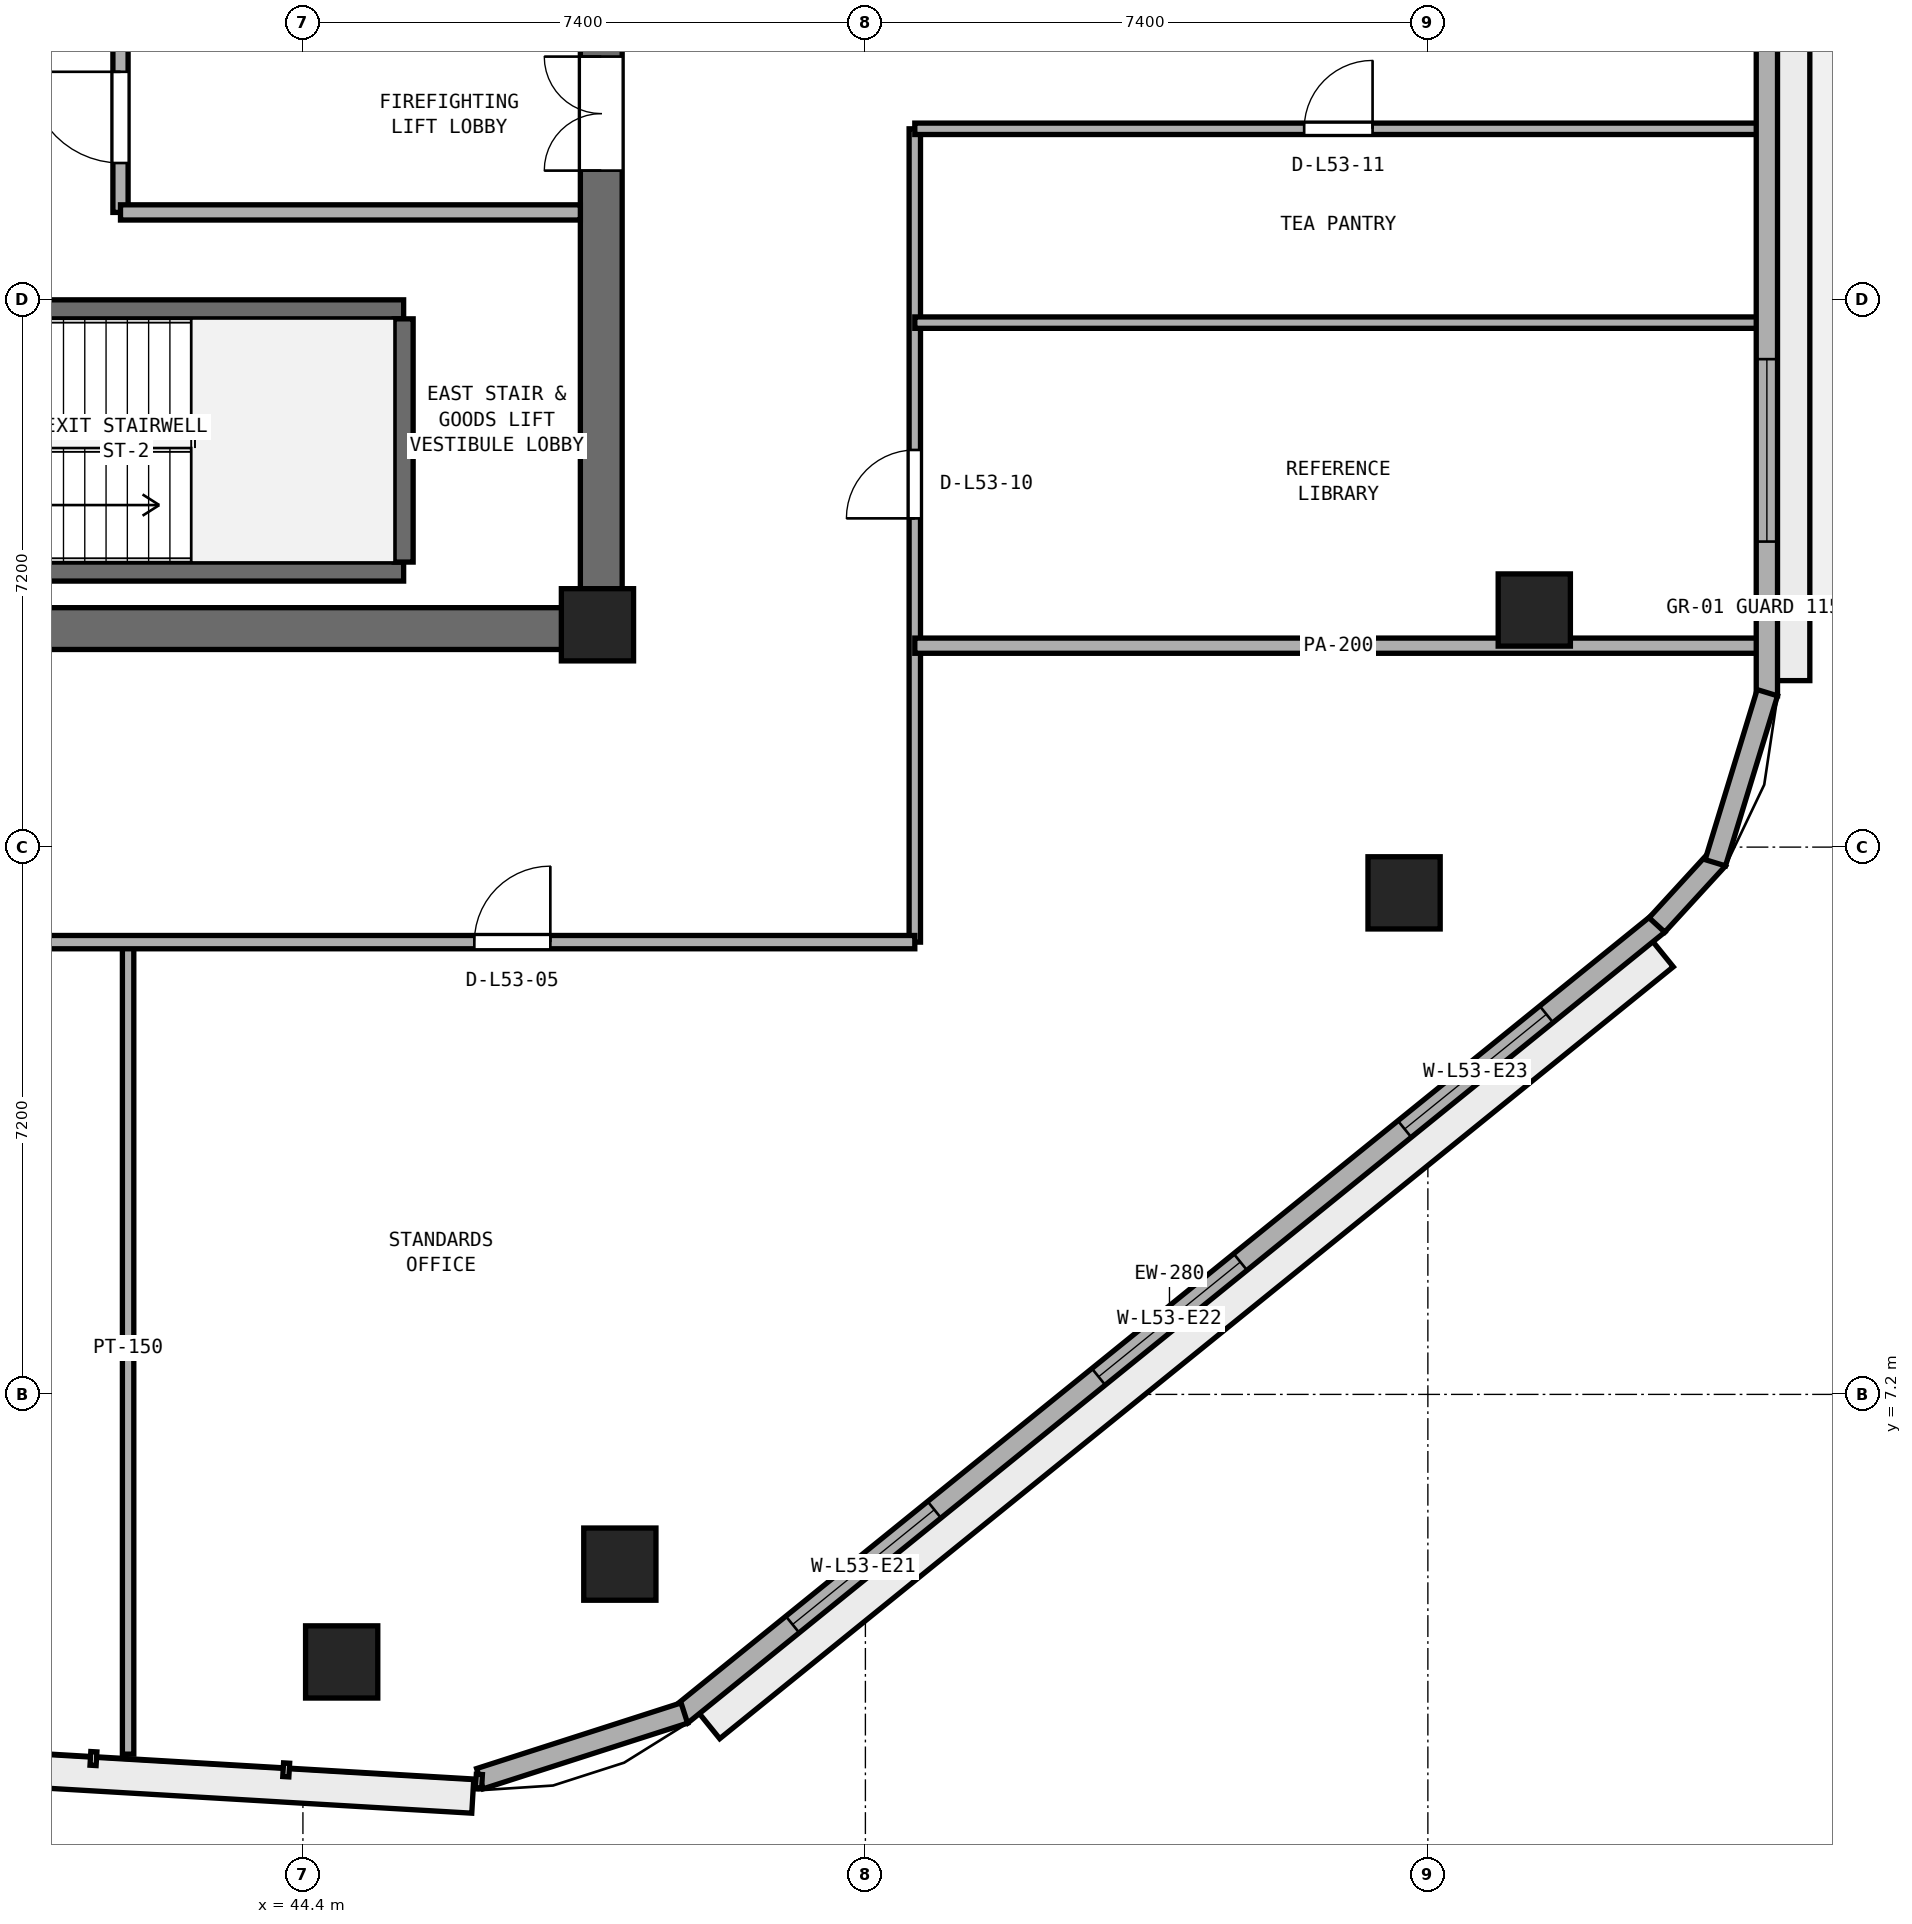
"""IFC4 building model, lengths in metres.
Left out: names, types, materials, properties, quantities, classifications, styles, units other than length and angle.
Written with IfcOpenShell. Run it as: python <this file> out.ifc"""

import sys

from ifc_helpers import new_model, si_unit, direction, frame, frame_2d, origin, origin_2d, place, context, subcontext, project, spatial, rectangle, extrude, element, fill, save


model = new_model("IFC4")
c1 = context("Model", 3, precision=1e-05, world=origin(), true_north=direction((0.0, 1.0)))
c2 = subcontext(c1, "Body", "Model", "MODEL_VIEW")
j1 = project(units=[si_unit("LENGTHUNIT", "METRE"), si_unit("PLANEANGLEUNIT", "RADIAN")], contexts=[c1])
p1 = place(None, origin())
s1 = spatial("IfcSite", under=j1, at=p1, CompositionType="ELEMENT")
p2 = place(p1, origin())
s2 = spatial("IfcBuilding", under=s1, at=p2, CompositionType="ELEMENT")
p3 = place(p2, frame((0.0, 0.0, 208.6)))
s3 = spatial("IfcBuildingStorey", under=s2, at=p3, CompositionType="ELEMENT", Elevation=208.6)
p4 = place(p3, frame((25.4, 17.275, 0.0), z_axis=(0.0, 0.0, 1.0), x_axis=(1.0, 0.0, 0.0)))
e1 = element("IfcWall", 1, at=p4, inside=s3, PredefinedType="SHEAR", context=c2, shape_type="SweptSolid", body=[
    extrude(rectangle(XDim=23.2, YDim=0.55, at=frame_2d((11.6, 0.0))), origin(), (0.0, 0.0, 1.0), 3.54),
])
p5 = place(p3, frame((48.325, 17.55, 0.0), z_axis=(0.0, 0.0, 1.0), x_axis=(0.0, 1.0, 0.0)))
e2 = element("IfcWall", 2, at=p5, inside=s3, PredefinedType="SHEAR", context=c2, shape_type="SweptSolid", body=[
    extrude(rectangle(XDim=15.3, YDim=0.55, at=frame_2d((7.65, 0.0))), origin(), (0.0, 0.0, 1.0), 3.54),
])
p6 = place(p5, frame((5.75, 0.0, 0.0)))
e3 = element("IfcOpeningElement", 3, at=p6, cuts=e2, PredefinedType="OPENING", context=c2, shape_type="SweptSolid", body=[
    extrude(rectangle(XDim=1.5, YDim=2.15, at=frame_2d((0.75, 1.075))), frame((0.0, 0.285, 0.0), z_axis=(0.0, -1.0, 0.0), x_axis=(1.0, 0.0, 0.0)), (0.0, 0.0, 1.0), 0.57),
])
p7 = place(p3, frame((48.275, 17.325, 0.0), z_axis=(0.0, 0.0, 1.0), x_axis=(1.0, 0.0, 0.0)))
e4 = element("IfcColumn", 4, at=p7, inside=s3, PredefinedType="PILASTER", context=c2, shape_type="SweptSolid", body=[
    extrude(rectangle(XDim=0.95, YDim=0.95, at=origin_2d()), origin(), (0.0, 0.0, 1.0), 3.8),
])
for number, where, z_axis, x_axis in (
    (5, (44.91, 3.68, 0.0), (0.0, 0.0, 1.0), (1.0, 0.0, 0.0)),
    (6, (48.57, 4.967, 0.0), (0.0, 0.0, 1.0), (1.0, 0.0, 0.0)),
    (7, (58.887, 13.798, 0.0), (0.0, 0.0, 1.0), (1.0, 0.0, 0.0)),
    (8, (60.6, 17.519, 0.0), (0.0, 0.0, 1.0), (1.0, 0.0, 0.0)),
):
    element("IfcColumn", number, at=place(p3, frame(where, z_axis=z_axis, x_axis=x_axis)), inside=s3, PredefinedType="COLUMN", context=c2, shape_type="SweptSolid", body=[
        extrude(rectangle(XDim=0.95, YDim=0.95, at=origin_2d()), origin(), (0.0, 0.0, 1.0), 3.8),
    ])
for number, where, z_axis, x_axis in (
    (9, (38.425, 18.025, 0.0), (0.0, 0.0, 1.0), (1.0, 0.0, 0.0)),
    (10, (38.425, 21.475, 0.0), (0.0, 0.0, 1.0), (1.0, 0.0, 0.0)),
):
    element("IfcWall", number, at=place(p3, frame(where, z_axis=z_axis, x_axis=x_axis)), inside=s3, PredefinedType="SHEAR", context=c2, shape_type="SweptSolid", body=[
        extrude(rectangle(XDim=7.3, YDim=0.25, at=frame_2d((3.65, 0.0))), origin(), (0.0, 0.0, 1.0), 3.54),
    ])
p8 = place(p3, frame((45.725, 18.15, 0.0), z_axis=(0.0, 0.0, 1.0), x_axis=(0.0, 1.0, 0.0)))
e11 = element("IfcWall", 11, at=p8, inside=s3, PredefinedType="SHEAR", context=c2, shape_type="SweptSolid", body=[
    extrude(rectangle(XDim=3.2, YDim=0.25, at=frame_2d((1.6, 0.0))), origin(), (0.0, 0.0, 1.0), 3.54),
])
p9 = place(p3, frame((42.0, 22.75, 0.0), z_axis=(0.0, 0.0, 1.0), x_axis=(0.0, 1.0, 0.0)))
e12 = element("IfcWall", 12, at=p9, inside=s3, PredefinedType="SOLIDWALL", context=c2, shape_type="SweptSolid", body=[
    extrude(rectangle(XDim=6.05, YDim=0.2, at=frame_2d((3.025, 0.0))), origin(), (0.0, 0.0, 1.0), 3.54),
])
p10 = place(p9, frame((0.65, 0.0, 0.0)))
e13 = element("IfcOpeningElement", 13, at=p10, cuts=e12, PredefinedType="OPENING", context=c2, shape_type="SweptSolid", body=[
    extrude(rectangle(XDim=1.2, YDim=2.15, at=frame_2d((0.6, 1.075))), frame((0.0, 0.11, 0.0), z_axis=(0.0, -1.0, 0.0), x_axis=(1.0, 0.0, 0.0)), (0.0, 0.0, 1.0), 0.22),
])
p11 = place(p3, frame((42.0, 22.75, 0.0), z_axis=(0.0, 0.0, 1.0), x_axis=(1.0, 0.0, 0.0)))
e14 = element("IfcWall", 14, at=p11, inside=s3, PredefinedType="SOLIDWALL", context=c2, shape_type="SweptSolid", body=[
    extrude(rectangle(XDim=6.05, YDim=0.2, at=frame_2d((3.025, 0.0))), origin(), (0.0, 0.0, 1.0), 3.54),
])
p12 = place(p3, frame((52.45, 13.15, 0.0), z_axis=(0.0, 0.0, 1.0), x_axis=(0.0, 1.0, 0.0)))
e15 = element("IfcWall", 15, at=p12, inside=s3, PredefinedType="PARTITIONING", context=c2, shape_type="SweptSolid", body=[
    extrude(rectangle(XDim=10.7, YDim=0.15, at=frame_2d((5.35, 0.0))), origin(), (0.0, 0.0, 1.0), 3.54),
])
p13 = place(p12, frame((5.575, 0.0, 0.0)))
e16 = element("IfcOpeningElement", 16, at=p13, cuts=e15, PredefinedType="OPENING", context=c2, shape_type="SweptSolid", body=[
    extrude(rectangle(XDim=0.9, YDim=2.1, at=frame_2d((0.45, 1.05))), frame((0.0, 0.085, 0.0), z_axis=(0.0, -1.0, 0.0), x_axis=(1.0, 0.0, 0.0)), (0.0, 0.0, 1.0), 0.17),
])
p14 = place(p3, frame((42.1, 2.467, 0.0), z_axis=(0.0, 0.0, 1.0), x_axis=(0.0, 1.0, 0.0)))
e17 = element("IfcWall", 17, at=p14, inside=s3, PredefinedType="PARTITIONING", context=c2, shape_type="SweptSolid", body=[
    extrude(rectangle(XDim=10.683, YDim=0.15, at=frame_2d((5.341, 0.0))), origin(), (0.0, 0.0, 1.0), 3.54),
])
p15 = place(p3, frame((21.55, 13.15, 0.0), z_axis=(0.0, 0.0, 1.0), x_axis=(1.0, 0.0, 0.0)))
e18 = element("IfcWall", 18, at=p15, inside=s3, PredefinedType="PARTITIONING", context=c2, shape_type="SweptSolid", body=[
    extrude(rectangle(XDim=30.9, YDim=0.175, at=frame_2d((15.45, 0.0))), origin(), (0.0, 0.0, 1.0), 3.54),
])
p16 = place(p15, frame((4.145, 0.0, 0.0)))
e19 = element("IfcOpeningElement", 19, at=p16, cuts=e18, PredefinedType="OPENING", context=c2, shape_type="SweptSolid", body=[
    extrude(rectangle(XDim=1.0, YDim=2.12, at=frame_2d((0.5, 1.06))), frame((0.0, 0.097, 0.0), z_axis=(0.0, -1.0, 0.0), x_axis=(1.0, 0.0, 0.0)), (0.0, 0.0, 1.0), 0.195),
])
p17 = place(p15, frame((14.3, 0.0, 0.0)))
e20 = element("IfcOpeningElement", 20, at=p17, cuts=e18, PredefinedType="OPENING", context=c2, shape_type="SweptSolid", body=[
    extrude(rectangle(XDim=1.0, YDim=2.12, at=frame_2d((0.5, 1.06))), frame((0.0, 0.097, 0.0), z_axis=(0.0, -1.0, 0.0), x_axis=(1.0, 0.0, 0.0)), (0.0, 0.0, 1.0), 0.195),
])
p18 = place(p15, frame((25.105, 0.0, 0.0)))
e21 = element("IfcOpeningElement", 21, at=p18, cuts=e18, PredefinedType="OPENING", context=c2, shape_type="SweptSolid", body=[
    extrude(rectangle(XDim=1.0, YDim=2.12, at=frame_2d((0.5, 1.06))), frame((0.0, 0.097, 0.0), z_axis=(0.0, -1.0, 0.0), x_axis=(1.0, 0.0, 0.0)), (0.0, 0.0, 1.0), 0.195),
])
p19 = place(p3, frame((52.45, 17.05, 0.0), z_axis=(0.0, 0.0, 1.0), x_axis=(1.0, 0.0, 0.0)))
e22 = element("IfcWall", 22, at=p19, inside=s3, PredefinedType="PARTITIONING", context=c2, shape_type="SweptSolid", body=[
    extrude(rectangle(XDim=11.145, YDim=0.2, at=frame_2d((5.573, 0.0))), origin(), (0.0, 0.0, 1.0), 2.79),
])
p20 = place(p3, frame((52.45, 21.3, 0.0), z_axis=(0.0, 0.0, 1.0), x_axis=(1.0, 0.0, 0.0)))
e23 = element("IfcWall", 23, at=p20, inside=s3, PredefinedType="PARTITIONING", context=c2, shape_type="SweptSolid", body=[
    extrude(rectangle(XDim=11.145, YDim=0.15, at=frame_2d((5.573, 0.0))), origin(), (0.0, 0.0, 1.0), 3.54),
])
p21 = place(p3, frame((52.45, 23.85, 0.0), z_axis=(0.0, 0.0, 1.0), x_axis=(1.0, 0.0, 0.0)))
e24 = element("IfcWall", 24, at=p21, inside=s3, PredefinedType="PARTITIONING", context=c2, shape_type="SweptSolid", body=[
    extrude(rectangle(XDim=11.145, YDim=0.15, at=frame_2d((5.573, 0.0))), origin(), (0.0, 0.0, 1.0), 3.54),
])
p22 = place(p21, frame((5.123, 0.0, 0.0)))
e25 = element("IfcOpeningElement", 25, at=p22, cuts=e24, PredefinedType="OPENING", context=c2, shape_type="SweptSolid", body=[
    extrude(rectangle(XDim=0.9, YDim=2.1, at=frame_2d((0.45, 1.05))), frame((0.0, 0.085, 0.0), z_axis=(0.0, -1.0, 0.0), x_axis=(1.0, 0.0, 0.0)), (0.0, 0.0, 1.0), 0.17),
])
p23 = place(p3, frame((49.372, 2.984, 0.0), z_axis=(0.0, 0.0, 1.0), x_axis=(0.777278899851, 0.629156190343, 0.0)))
e26 = element("IfcWall", 26, at=p23, inside=s3, PredefinedType="STANDARD", context=c2, shape_type="SweptSolid", body=[
    extrude(rectangle(XDim=16.54, YDim=0.28, at=frame_2d((8.27, 0.0))), origin(), (0.0, 0.0, 1.0), 3.54),
])
p24 = place(p23, frame((1.89, 0.0, 0.9)))
e27 = element("IfcOpeningElement", 27, at=p24, cuts=e26, PredefinedType="OPENING", context=c2, shape_type="SweptSolid", body=[
    extrude(rectangle(XDim=2.4, YDim=1.75, at=frame_2d((1.2, 0.875))), frame((0.0, 0.15, 0.0), z_axis=(0.0, -1.0, 0.0), x_axis=(1.0, 0.0, 0.0)), (0.0, 0.0, 1.0), 0.3),
])
p25 = place(p23, frame((7.07, 0.0, 0.9)))
e28 = element("IfcOpeningElement", 28, at=p25, cuts=e26, PredefinedType="OPENING", context=c2, shape_type="SweptSolid", body=[
    extrude(rectangle(XDim=2.4, YDim=1.75, at=frame_2d((1.2, 0.875))), frame((0.0, 0.15, 0.0), z_axis=(0.0, -1.0, 0.0), x_axis=(1.0, 0.0, 0.0)), (0.0, 0.0, 1.0), 0.3),
])
p26 = place(p23, frame((12.25, 0.0, 0.9)))
e29 = element("IfcOpeningElement", 29, at=p26, cuts=e26, PredefinedType="OPENING", context=c2, shape_type="SweptSolid", body=[
    extrude(rectangle(XDim=2.4, YDim=1.75, at=frame_2d((1.2, 0.875))), frame((0.0, 0.15, 0.0), z_axis=(0.0, -1.0, 0.0), x_axis=(1.0, 0.0, 0.0)), (0.0, 0.0, 1.0), 0.3),
])
p27 = place(p3, frame((63.66, 16.39, 0.0), z_axis=(0.0, 0.0, 1.0), x_axis=(0.0, 1.0, 0.0)))
e30 = element("IfcWall", 30, at=p27, inside=s3, PredefinedType="STANDARD", context=c2, shape_type="SweptSolid", body=[
    extrude(rectangle(XDim=18.876, YDim=0.28, at=frame_2d((9.438, 0.0))), origin(), (0.0, 0.0, 1.0), 3.54),
])
p28 = place(p27, frame((8.588, 0.0, 0.0)))
e31 = element("IfcOpeningElement", 31, at=p28, cuts=e30, PredefinedType="OPENING", context=c2, shape_type="SweptSolid", body=[
    extrude(rectangle(XDim=1.1, YDim=2.2, at=frame_2d((0.55, 1.1))), frame((0.0, 0.15, 0.0), z_axis=(0.0, -1.0, 0.0), x_axis=(1.0, 0.0, 0.0)), (0.0, 0.0, 1.0), 0.3),
])
p29 = place(p27, frame((2.029, 0.0, 0.9)))
e32 = element("IfcOpeningElement", 32, at=p29, cuts=e30, PredefinedType="OPENING", context=c2, shape_type="SweptSolid", body=[
    extrude(rectangle(XDim=2.4, YDim=1.75, at=frame_2d((1.2, 0.875))), frame((0.0, 0.15, 0.0), z_axis=(0.0, -1.0, 0.0), x_axis=(1.0, 0.0, 0.0)), (0.0, 0.0, 1.0), 0.3),
])
p30 = place(p27, frame((14.197, 0.0, 0.9)))
e33 = element("IfcOpeningElement", 33, at=p30, cuts=e30, PredefinedType="OPENING", context=c2, shape_type="SweptSolid", body=[
    extrude(rectangle(XDim=2.4, YDim=1.75, at=frame_2d((1.2, 0.875))), frame((0.0, 0.15, 0.0), z_axis=(0.0, -1.0, 0.0), x_axis=(1.0, 0.0, 0.0)), (0.0, 0.0, 1.0), 0.3),
])
p31 = place(p3, frame((46.728, 2.144, 0.0), z_axis=(0.0, 0.0, 1.0), x_axis=(0.952083394887, 0.305838534493, 0.0)))
e34 = element("IfcWall", 34, at=p31, inside=s3, PredefinedType="STANDARD", context=c2, shape_type="SweptSolid", body=[
    extrude(rectangle(XDim=2.825, YDim=0.28, at=frame_2d((1.413, 0.0))), origin(), (0.0, 0.0, 1.0), 3.54),
])
p32 = place(p3, frame((62.213, 13.376, 0.0), z_axis=(0.0, 0.0, 1.0), x_axis=(0.675790054291, 0.737094161232, 0.0)))
e35 = element("IfcWall", 35, at=p32, inside=s3, PredefinedType="STANDARD", context=c2, shape_type="SweptSolid", body=[
    extrude(rectangle(XDim=1.183, YDim=0.28, at=frame_2d((0.591, 0.0))), origin(), (0.0, 0.0, 1.0), 3.54),
])
p33 = place(p3, frame((62.982, 14.194, 0.0), z_axis=(0.0, 0.0, 1.0), x_axis=(0.292398811023, 0.956296468315, 0.0)))
e36 = element("IfcWall", 36, at=p33, inside=s3, PredefinedType="STANDARD", context=c2, shape_type="SweptSolid", body=[
    extrude(rectangle(XDim=2.34, YDim=0.28, at=frame_2d((1.17, 0.0))), origin(), (0.0, 0.0, 1.0), 3.54),
])
p34 = place(p10, origin())
e37 = element("IfcDoor", 37, at=p34, inside=s3, OperationType="SINGLE_SWING_RIGHT", PredefinedType="DOOR", context=c2, shape_type="SweptSolid", body=[
    extrude(rectangle(XDim=1.2, YDim=2.15, at=frame_2d((0.6, 1.075))), frame((0.0, 0.025, 0.0), z_axis=(0.0, -1.0, 0.0), x_axis=(1.0, 0.0, 0.0)), (0.0, 0.0, 1.0), 0.05),
])
fill(e13, e37)
p35 = place(p6, origin())
e38 = element("IfcDoor", 38, at=p35, inside=s3, OperationType="DOUBLE_DOOR_SINGLE_SWING", PredefinedType="DOOR", context=c2, shape_type="SweptSolid", body=[
    extrude(rectangle(XDim=1.5, YDim=2.15, at=frame_2d((0.75, 1.075))), frame((0.0, 0.025, 0.0), z_axis=(0.0, -1.0, 0.0), x_axis=(1.0, 0.0, 0.0)), (0.0, 0.0, 1.0), 0.05),
])
fill(e3, e38)
p36 = place(p18, origin())
e39 = element("IfcDoor", 39, at=p36, inside=s3, OperationType="SINGLE_SWING_RIGHT", PredefinedType="DOOR", context=c2, shape_type="SweptSolid", body=[
    extrude(rectangle(XDim=1.0, YDim=2.12, at=frame_2d((0.5, 1.06))), frame((0.0, 0.025, 0.0), z_axis=(0.0, -1.0, 0.0), x_axis=(1.0, 0.0, 0.0)), (0.0, 0.0, 1.0), 0.05),
])
fill(e21, e39)
p37 = place(p13, origin())
e40 = element("IfcDoor", 40, at=p37, inside=s3, OperationType="SINGLE_SWING_LEFT", PredefinedType="DOOR", context=c2, shape_type="SweptSolid", body=[
    extrude(rectangle(XDim=0.9, YDim=2.1, at=frame_2d((0.45, 1.05))), frame((0.0, 0.025, 0.0), z_axis=(0.0, -1.0, 0.0), x_axis=(1.0, 0.0, 0.0)), (0.0, 0.0, 1.0), 0.05),
])
fill(e16, e40)
p38 = place(p22, origin())
e41 = element("IfcDoor", 41, at=p38, inside=s3, OperationType="SINGLE_SWING_RIGHT", PredefinedType="DOOR", context=c2, shape_type="SweptSolid", body=[
    extrude(rectangle(XDim=0.9, YDim=2.1, at=frame_2d((0.45, 1.05))), frame((0.0, 0.025, 0.0), z_axis=(0.0, -1.0, 0.0), x_axis=(1.0, 0.0, 0.0)), (0.0, 0.0, 1.0), 0.05),
])
fill(e25, e41)
p39 = place(p24, origin())
e42 = element("IfcWindow", 42, at=p39, inside=s3, PartitioningType="SINGLE_PANEL", PredefinedType="WINDOW", context=c2, shape_type="SweptSolid", body=[
    extrude(rectangle(XDim=2.4, YDim=1.75, at=frame_2d((1.2, 0.875))), frame((0.0, 0.03, 0.0), z_axis=(0.0, -1.0, 0.0), x_axis=(1.0, 0.0, 0.0)), (0.0, 0.0, 1.0), 0.06),
])
fill(e27, e42)
p40 = place(p25, origin())
e43 = element("IfcWindow", 43, at=p40, inside=s3, PartitioningType="SINGLE_PANEL", PredefinedType="WINDOW", context=c2, shape_type="SweptSolid", body=[
    extrude(rectangle(XDim=2.4, YDim=1.75, at=frame_2d((1.2, 0.875))), frame((0.0, 0.03, 0.0), z_axis=(0.0, -1.0, 0.0), x_axis=(1.0, 0.0, 0.0)), (0.0, 0.0, 1.0), 0.06),
])
fill(e28, e43)
p41 = place(p26, origin())
e44 = element("IfcWindow", 44, at=p41, inside=s3, PartitioningType="SINGLE_PANEL", PredefinedType="WINDOW", context=c2, shape_type="SweptSolid", body=[
    extrude(rectangle(XDim=2.4, YDim=1.75, at=frame_2d((1.2, 0.875))), frame((0.0, 0.03, 0.0), z_axis=(0.0, -1.0, 0.0), x_axis=(1.0, 0.0, 0.0)), (0.0, 0.0, 1.0), 0.06),
])
fill(e29, e44)
p42 = place(p29, origin())
e45 = element("IfcWindow", 45, at=p42, inside=s3, PartitioningType="SINGLE_PANEL", PredefinedType="WINDOW", context=c2, shape_type="SweptSolid", body=[
    extrude(rectangle(XDim=2.4, YDim=1.75, at=frame_2d((1.2, 0.875))), frame((0.0, 0.03, 0.0), z_axis=(0.0, -1.0, 0.0), x_axis=(1.0, 0.0, 0.0)), (0.0, 0.0, 1.0), 0.06),
])
fill(e32, e45)
save(model, sys.argv[1])
